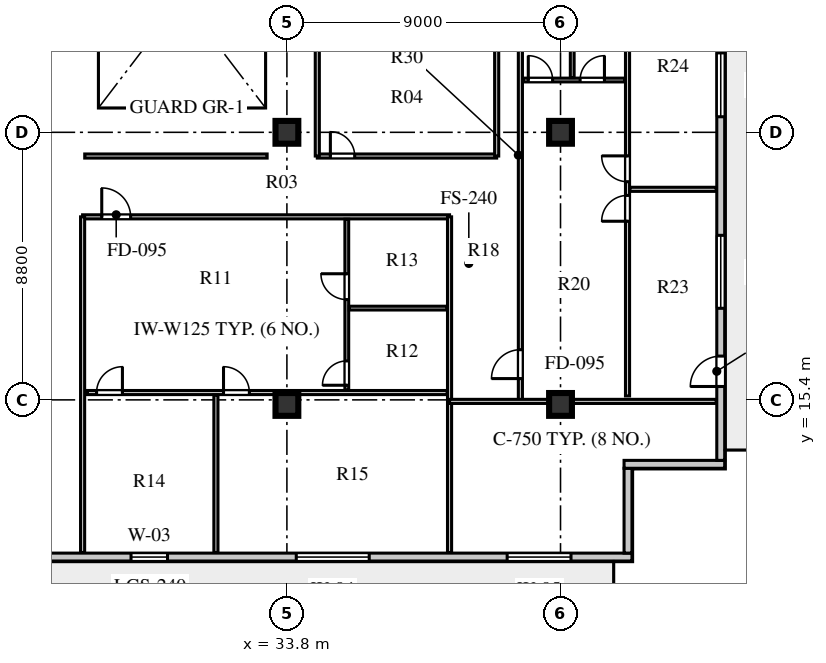
"""IFC4 building model, lengths in metres.
Left out: names, types, materials, properties, quantities, classifications, styles, units other than length and angle.
Written with IfcOpenShell. Run it as: python <this file> out.ifc"""

import sys

from ifc_helpers import new_model, si_unit, direction, frame, frame_2d, origin, origin_2d, place, context, subcontext, project, spatial, rectangle, extrude, element, fill, save


model = new_model("IFC4")
c1 = context("Model", 3, precision=1e-05, world=origin(), true_north=direction((0.0, 1.0)))
c2 = subcontext(c1, "Body", "Model", "MODEL_VIEW")
j1 = project(units=[si_unit("LENGTHUNIT", "METRE"), si_unit("PLANEANGLEUNIT", "RADIAN")], contexts=[c1])
p1 = place(None, origin())
s1 = spatial("IfcSite", under=j1, at=p1, CompositionType="ELEMENT")
p2 = place(p1, origin())
s2 = spatial("IfcBuilding", under=s1, at=p2, CompositionType="ELEMENT")
p3 = place(p2, frame((0.0, 0.0, 296.0)))
s3 = spatial("IfcBuildingStorey", under=s2, at=p3, CompositionType="ELEMENT", Elevation=296.0)
for number, where, z_axis, x_axis in (
    (1, (33.8, 15.25, 0.0), (0.0, 0.0, 1.0), (1.0, 0.0, 0.0)),
    (2, (33.8, 24.2, 0.0), (0.0, 0.0, 1.0), (1.0, 0.0, 0.0)),
    (3, (42.8, 15.25, 0.0), (0.0, 0.0, 1.0), (1.0, 0.0, 0.0)),
    (4, (42.8, 24.2, 0.0), (0.0, 0.0, 1.0), (1.0, 0.0, 0.0)),
):
    element("IfcColumn", number, at=place(p3, frame(where, z_axis=z_axis, x_axis=x_axis)), inside=s3, PredefinedType="COLUMN", context=c2, shape_type="SweptSolid", body=[
        extrude(rectangle(XDim=0.75, YDim=0.75, at=origin_2d()), origin(), (0.0, 0.0, 1.0), 3.66),
    ])
p4 = place(p3, frame((13.45, 10.23, 0.0), z_axis=(0.0, 0.0, 1.0), x_axis=(1.0, 0.0, 0.0)))
e5 = element("IfcWall", 5, at=p4, inside=s3, PredefinedType="SOLIDWALL", context=c2, shape_type="SweptSolid", body=[
    extrude(rectangle(XDim=31.7, YDim=0.26, at=frame_2d((15.85, 0.0))), origin(), (0.0, 0.0, 1.0), 3.66),
])
p5 = place(p4, frame((0.95, 0.0, 0.0)))
e6 = element("IfcOpeningElement", 6, at=p5, cuts=e5, PredefinedType="OPENING", context=c2, shape_type="SweptSolid", body=[
    extrude(rectangle(XDim=1.0, YDim=2.05, at=frame_2d((0.5, 1.025))), frame((0.0, 0.14, 0.0), z_axis=(0.0, -1.0, 0.0), x_axis=(1.0, 0.0, 0.0)), (0.0, 0.0, 1.0), 0.28),
])
p6 = place(p4, frame((6.085, 0.0, 0.8)))
e7 = element("IfcOpeningElement", 7, at=p6, cuts=e5, PredefinedType="OPENING", context=c2, shape_type="SweptSolid", body=[
    extrude(rectangle(XDim=1.5, YDim=2.0, at=frame_2d((0.75, 1.0))), frame((0.0, 0.14, 0.0), z_axis=(0.0, -1.0, 0.0), x_axis=(1.0, 0.0, 0.0)), (0.0, 0.0, 1.0), 0.28),
])
p7 = place(p4, frame((15.223, 0.0, 0.8)))
e8 = element("IfcOpeningElement", 8, at=p7, cuts=e5, PredefinedType="OPENING", context=c2, shape_type="SweptSolid", body=[
    extrude(rectangle(XDim=1.2, YDim=1.75, at=frame_2d((0.6, 0.875))), frame((0.0, 0.14, 0.0), z_axis=(0.0, -1.0, 0.0), x_axis=(1.0, 0.0, 0.0)), (0.0, 0.0, 1.0), 0.28),
])
p8 = place(p4, frame((20.658, 0.0, 0.8)))
e9 = element("IfcOpeningElement", 9, at=p8, cuts=e5, PredefinedType="OPENING", context=c2, shape_type="SweptSolid", body=[
    extrude(rectangle(XDim=2.4, YDim=2.05, at=frame_2d((1.2, 1.025))), frame((0.0, 0.14, 0.0), z_axis=(0.0, -1.0, 0.0), x_axis=(1.0, 0.0, 0.0)), (0.0, 0.0, 1.0), 0.28),
])
p9 = place(p4, frame((27.595, 0.0, 0.8)))
e10 = element("IfcOpeningElement", 10, at=p9, cuts=e5, PredefinedType="OPENING", context=c2, shape_type="SweptSolid", body=[
    extrude(rectangle(XDim=2.1, YDim=1.95, at=frame_2d((1.05, 0.975))), frame((0.0, 0.14, 0.0), z_axis=(0.0, -1.0, 0.0), x_axis=(1.0, 0.0, 0.0)), (0.0, 0.0, 1.0), 0.28),
])
p10 = place(p3, frame((45.02, 10.36, 0.0), z_axis=(0.0, 0.0, 1.0), x_axis=(0.0, 1.0, 0.0)))
e11 = element("IfcWall", 11, at=p10, inside=s3, PredefinedType="SOLIDWALL", context=c2, shape_type="SweptSolid", body=[
    extrude(rectangle(XDim=2.79, YDim=0.26, at=frame_2d((1.395, 0.0))), origin(), (0.0, 0.0, 1.0), 3.66),
])
p11 = place(p3, frame((44.89, 13.28, 0.0), z_axis=(0.0, 0.0, 1.0), x_axis=(1.0, 0.0, 0.0)))
e12 = element("IfcWall", 12, at=p11, inside=s3, PredefinedType="SOLIDWALL", context=c2, shape_type="SweptSolid", body=[
    extrude(rectangle(XDim=3.31, YDim=0.26, at=frame_2d((1.655, 0.0))), origin(), (0.0, 0.0, 1.0), 3.66),
])
p12 = place(p3, frame((48.07, 13.41, 0.0), z_axis=(0.0, 0.0, 1.0), x_axis=(0.0, 1.0, 0.0)))
e13 = element("IfcWall", 13, at=p12, inside=s3, PredefinedType="SOLIDWALL", context=c2, shape_type="SweptSolid", body=[
    extrude(rectangle(XDim=30.38, YDim=0.26, at=frame_2d((15.19, 0.0))), origin(), (0.0, 0.0, 1.0), 3.66),
])
p13 = place(p12, frame((2.43, 0.0, 0.0)))
e14 = element("IfcOpeningElement", 14, at=p13, cuts=e13, PredefinedType="OPENING", context=c2, shape_type="SweptSolid", body=[
    extrude(rectangle(XDim=1.0, YDim=2.05, at=frame_2d((0.5, 1.025))), frame((0.0, 0.14, 0.0), z_axis=(0.0, -1.0, 0.0), x_axis=(1.0, 0.0, 0.0)), (0.0, 0.0, 1.0), 0.28),
])
p14 = place(p12, frame((5.002, 0.0, 0.8)))
e15 = element("IfcOpeningElement", 15, at=p14, cuts=e13, PredefinedType="OPENING", context=c2, shape_type="SweptSolid", body=[
    extrude(rectangle(XDim=2.4, YDim=2.05, at=frame_2d((1.2, 1.025))), frame((0.0, 0.14, 0.0), z_axis=(0.0, -1.0, 0.0), x_axis=(1.0, 0.0, 0.0)), (0.0, 0.0, 1.0), 0.28),
])
p15 = place(p12, frame((11.302, 0.0, 0.8)))
e16 = element("IfcOpeningElement", 16, at=p15, cuts=e13, PredefinedType="OPENING", context=c2, shape_type="SweptSolid", body=[
    extrude(rectangle(XDim=2.1, YDim=1.95, at=frame_2d((1.05, 0.975))), frame((0.0, 0.14, 0.0), z_axis=(0.0, -1.0, 0.0), x_axis=(1.0, 0.0, 0.0)), (0.0, 0.0, 1.0), 0.28),
])
p16 = place(p12, frame((18.252, 0.0, 0.8)))
e17 = element("IfcOpeningElement", 17, at=p16, cuts=e13, PredefinedType="OPENING", context=c2, shape_type="SweptSolid", body=[
    extrude(rectangle(XDim=1.35, YDim=1.9, at=frame_2d((0.675, 0.95))), frame((0.0, 0.14, 0.0), z_axis=(0.0, -1.0, 0.0), x_axis=(1.0, 0.0, 0.0)), (0.0, 0.0, 1.0), 0.28),
])
p17 = place(p12, frame((24.427, 0.0, 0.8)))
e18 = element("IfcOpeningElement", 18, at=p17, cuts=e13, PredefinedType="OPENING", context=c2, shape_type="SweptSolid", body=[
    extrude(rectangle(XDim=1.65, YDim=1.95, at=frame_2d((0.825, 0.975))), frame((0.0, 0.14, 0.0), z_axis=(0.0, -1.0, 0.0), x_axis=(1.0, 0.0, 0.0)), (0.0, 0.0, 1.0), 0.28),
])
p18 = place(p3, frame((27.08, 21.42, 0.0), z_axis=(0.0, 0.0, 1.0), x_axis=(1.0, 0.0, 0.0)))
e19 = element("IfcWall", 19, at=p18, inside=s3, PredefinedType="PARTITIONING", context=c2, shape_type="SweptSolid", body=[
    extrude(rectangle(XDim=12.07, YDim=0.135, at=frame_2d((6.035, 0.0))), origin(), (0.0, 0.0, 1.0), 3.36),
])
p19 = place(p18, frame((0.63, 0.0, 0.0)))
e20 = element("IfcOpeningElement", 20, at=p19, cuts=e19, PredefinedType="OPENING", context=c2, shape_type="SweptSolid", body=[
    extrude(rectangle(XDim=0.95, YDim=2.1, at=frame_2d((0.475, 1.05))), frame((0.0, 0.078, 0.0), z_axis=(0.0, -1.0, 0.0), x_axis=(1.0, 0.0, 0.0)), (0.0, 0.0, 1.0), 0.155),
])
p20 = place(p3, frame((27.08, 10.38, 0.0), z_axis=(0.0, 0.0, 1.0), x_axis=(0.0, 1.0, 0.0)))
e21 = element("IfcWall", 21, at=p20, inside=s3, PredefinedType="PARTITIONING", context=c2, shape_type="SweptSolid", body=[
    extrude(rectangle(XDim=11.04, YDim=0.135, at=frame_2d((5.52, 0.0))), origin(), (0.0, 0.0, 1.0), 3.66),
])
p21 = place(p3, frame((27.15, 23.42, 0.0), z_axis=(0.0, 0.0, 1.0), x_axis=(1.0, 0.0, 0.0)))
e22 = element("IfcWall", 22, at=p21, inside=s3, PredefinedType="PARTITIONING", context=c2, shape_type="SweptSolid", body=[
    extrude(rectangle(XDim=6.0, YDim=0.135, at=frame_2d((3.0, 0.0))), origin(), (0.0, 0.0, 1.0), 3.66),
])
p22 = place(p3, frame((39.15, 10.38, 0.0), z_axis=(0.0, 0.0, 1.0), x_axis=(0.0, 1.0, 0.0)))
e23 = element("IfcWall", 23, at=p22, inside=s3, PredefinedType="PARTITIONING", context=c2, shape_type="SweptSolid", body=[
    extrude(rectangle(XDim=11.04, YDim=0.135, at=frame_2d((5.52, 0.0))), origin(), (0.0, 0.0, 1.0), 3.66),
])
p23 = place(p3, frame((27.24, 15.641, 0.0), z_axis=(0.0, 0.0, 1.0), x_axis=(1.0, 0.0, 0.0)))
e24 = element("IfcWall", 24, at=p23, inside=s3, PredefinedType="PARTITIONING", context=c2, shape_type="SweptSolid", body=[
    extrude(rectangle(XDim=11.83, YDim=0.135, at=frame_2d((5.915, 0.0))), origin(), (0.0, 0.0, 1.0), 3.66),
])
p24 = place(p23, frame((0.3, 0.0, 0.0)))
e25 = element("IfcOpeningElement", 25, at=p24, cuts=e24, PredefinedType="OPENING", context=c2, shape_type="SweptSolid", body=[
    extrude(rectangle(XDim=0.85, YDim=2.08, at=frame_2d((0.425, 1.04))), frame((0.0, 0.078, 0.0), z_axis=(0.0, -1.0, 0.0), x_axis=(1.0, 0.0, 0.0)), (0.0, 0.0, 1.0), 0.155),
])
p25 = place(p23, frame((4.475, 0.0, 0.0)))
e26 = element("IfcOpeningElement", 26, at=p25, cuts=e24, PredefinedType="OPENING", context=c2, shape_type="SweptSolid", body=[
    extrude(rectangle(XDim=0.85, YDim=2.08, at=frame_2d((0.425, 1.04))), frame((0.0, 0.078, 0.0), z_axis=(0.0, -1.0, 0.0), x_axis=(1.0, 0.0, 0.0)), (0.0, 0.0, 1.0), 0.155),
])
p26 = place(p3, frame((35.77, 15.721, 0.0), z_axis=(0.0, 0.0, 1.0), x_axis=(0.0, 1.0, 0.0)))
e27 = element("IfcWall", 27, at=p26, inside=s3, PredefinedType="PLUMBINGWALL", context=c2, shape_type="SweptSolid", body=[
    extrude(rectangle(XDim=5.619, YDim=0.125, at=frame_2d((2.81, 0.0))), origin(), (0.0, 0.0, 1.0), 3.66),
])
p27 = place(p26, frame((0.16, 0.0, 0.0)))
e28 = element("IfcOpeningElement", 28, at=p27, cuts=e27, PredefinedType="OPENING", context=c2, shape_type="SweptSolid", body=[
    extrude(rectangle(XDim=0.8, YDim=2.05, at=frame_2d((0.4, 1.025))), frame((0.0, 0.073, 0.0), z_axis=(0.0, -1.0, 0.0), x_axis=(1.0, 0.0, 0.0)), (0.0, 0.0, 1.0), 0.145),
])
p28 = place(p26, frame((2.977, 0.0, 0.0)))
e29 = element("IfcOpeningElement", 29, at=p28, cuts=e27, PredefinedType="OPENING", context=c2, shape_type="SweptSolid", body=[
    extrude(rectangle(XDim=0.85, YDim=2.08, at=frame_2d((0.425, 1.04))), frame((0.0, 0.073, 0.0), z_axis=(0.0, -1.0, 0.0), x_axis=(1.0, 0.0, 0.0)), (0.0, 0.0, 1.0), 0.145),
])
p29 = place(p3, frame((35.85, 18.418, 0.0), z_axis=(0.0, 0.0, 1.0), x_axis=(1.0, 0.0, 0.0)))
e30 = element("IfcWall", 30, at=p29, inside=s3, PredefinedType="PLUMBINGWALL", context=c2, shape_type="SweptSolid", body=[
    extrude(rectangle(XDim=3.22, YDim=0.125, at=frame_2d((1.61, 0.0))), origin(), (0.0, 0.0, 1.0), 3.36),
])
p30 = place(p3, frame((31.465, 10.38, 0.0), z_axis=(0.0, 0.0, 1.0), x_axis=(0.0, 1.0, 0.0)))
e31 = element("IfcWall", 31, at=p30, inside=s3, PredefinedType="PARTITIONING", context=c2, shape_type="SweptSolid", body=[
    extrude(rectangle(XDim=5.181, YDim=0.135, at=frame_2d((2.591, 0.0))), origin(), (0.0, 0.0, 1.0), 3.66),
])
p31 = place(p3, frame((41.48, 15.35, 0.0), z_axis=(0.0, 0.0, 1.0), x_axis=(0.0, 1.0, 0.0)))
e32 = element("IfcWall", 32, at=p31, inside=s3, PredefinedType="PARTITIONING", context=c2, shape_type="SweptSolid", body=[
    extrude(rectangle(XDim=26.5, YDim=0.135, at=frame_2d((13.25, 0.0))), origin(), (0.0, 0.0, 1.0), 3.66),
])
p32 = place(p31, frame((0.75, 0.0, 0.0)))
e33 = element("IfcOpeningElement", 33, at=p32, cuts=e32, PredefinedType="OPENING", context=c2, shape_type="SweptSolid", body=[
    extrude(rectangle(XDim=0.95, YDim=2.1, at=frame_2d((0.475, 1.05))), frame((0.0, 0.078, 0.0), z_axis=(0.0, -1.0, 0.0), x_axis=(1.0, 0.0, 0.0)), (0.0, 0.0, 1.0), 0.155),
])
p33 = place(p31, frame((14.5, 0.0, 0.0)))
e34 = element("IfcOpeningElement", 34, at=p33, cuts=e32, PredefinedType="OPENING", context=c2, shape_type="SweptSolid", body=[
    extrude(rectangle(XDim=0.95, YDim=2.1, at=frame_2d((0.475, 1.05))), frame((0.0, 0.078, 0.0), z_axis=(0.0, -1.0, 0.0), x_axis=(1.0, 0.0, 0.0)), (0.0, 0.0, 1.0), 0.155),
])
p34 = place(p3, frame((39.15, 15.35, 0.0), z_axis=(0.0, 0.0, 1.0), x_axis=(1.0, 0.0, 0.0)))
e35 = element("IfcWall", 35, at=p34, inside=s3, PredefinedType="PARTITIONING", context=c2, shape_type="SweptSolid", body=[
    extrude(rectangle(XDim=8.77, YDim=0.135, at=frame_2d((4.385, 0.0))), origin(), (0.0, 0.0, 1.0), 3.06),
])
p35 = place(p3, frame((45.004, 15.53, 0.0), z_axis=(0.0, 0.0, 1.0), x_axis=(0.0, 1.0, 0.0)))
e36 = element("IfcWall", 36, at=p35, inside=s3, PredefinedType="PARTITIONING", context=c2, shape_type="SweptSolid", body=[
    extrude(rectangle(XDim=13.59, YDim=0.135, at=frame_2d((6.795, 0.0))), origin(), (0.0, 0.0, 1.0), 3.66),
])
p36 = place(p35, frame((5.745, 0.0, 0.0)))
e37 = element("IfcOpeningElement", 37, at=p36, cuts=e36, PredefinedType="OPENING", context=c2, shape_type="SweptSolid", body=[
    extrude(rectangle(XDim=0.85, YDim=2.08, at=frame_2d((0.425, 1.04))), frame((0.0, 0.078, 0.0), z_axis=(0.0, -1.0, 0.0), x_axis=(1.0, 0.0, 0.0)), (0.0, 0.0, 1.0), 0.155),
])
p37 = place(p35, frame((7.045, 0.0, 0.0)))
e38 = element("IfcOpeningElement", 38, at=p37, cuts=e36, PredefinedType="OPENING", context=c2, shape_type="SweptSolid", body=[
    extrude(rectangle(XDim=0.85, YDim=2.08, at=frame_2d((0.425, 1.04))), frame((0.0, 0.078, 0.0), z_axis=(0.0, -1.0, 0.0), x_axis=(1.0, 0.0, 0.0)), (0.0, 0.0, 1.0), 0.155),
])
p38 = place(p3, frame((41.58, 25.92, 0.0), z_axis=(0.0, 0.0, 1.0), x_axis=(1.0, 0.0, 0.0)))
e39 = element("IfcWall", 39, at=p38, inside=s3, PredefinedType="PLUMBINGWALL", context=c2, shape_type="SweptSolid", body=[
    extrude(rectangle(XDim=3.344, YDim=0.125, at=frame_2d((1.672, 0.0))), origin(), (0.0, 0.0, 1.0), 3.66),
])
p39 = place(p38, frame((0.16, 0.0, 0.0)))
e40 = element("IfcOpeningElement", 40, at=p39, cuts=e39, PredefinedType="OPENING", context=c2, shape_type="SweptSolid", body=[
    extrude(rectangle(XDim=0.8, YDim=2.05, at=frame_2d((0.4, 1.025))), frame((0.0, 0.073, 0.0), z_axis=(0.0, -1.0, 0.0), x_axis=(1.0, 0.0, 0.0)), (0.0, 0.0, 1.0), 0.145),
])
p40 = place(p38, frame((1.865, 0.0, 0.0)))
e41 = element("IfcOpeningElement", 41, at=p40, cuts=e39, PredefinedType="OPENING", context=c2, shape_type="SweptSolid", body=[
    extrude(rectangle(XDim=0.8, YDim=2.05, at=frame_2d((0.4, 1.025))), frame((0.0, 0.073, 0.0), z_axis=(0.0, -1.0, 0.0), x_axis=(1.0, 0.0, 0.0)), (0.0, 0.0, 1.0), 0.145),
])
p41 = place(p3, frame((43.185, 26.0, 0.0), z_axis=(0.0, 0.0, 1.0), x_axis=(0.0, 1.0, 0.0)))
e42 = element("IfcWall", 42, at=p41, inside=s3, PredefinedType="PLUMBINGWALL", context=c2, shape_type="SweptSolid", body=[
    extrude(rectangle(XDim=3.12, YDim=0.125, at=frame_2d((1.56, 0.0))), origin(), (0.0, 0.0, 1.0), 3.66),
])
p42 = place(p3, frame((45.084, 22.325, 0.0), z_axis=(0.0, 0.0, 1.0), x_axis=(1.0, 0.0, 0.0)))
e43 = element("IfcWall", 43, at=p42, inside=s3, PredefinedType="PARTITIONING", context=c2, shape_type="SweptSolid", body=[
    extrude(rectangle(XDim=2.836, YDim=0.135, at=frame_2d((1.418, 0.0))), origin(), (0.0, 0.0, 1.0), 3.66),
])
p43 = place(p3, frame((34.8, 23.42, 0.0), z_axis=(0.0, 0.0, 1.0), x_axis=(1.0, 0.0, 0.0)))
e44 = element("IfcWall", 44, at=p43, inside=s3, PredefinedType="PARTITIONING", context=c2, shape_type="SweptSolid", body=[
    extrude(rectangle(XDim=5.9, YDim=0.135, at=frame_2d((2.95, 0.0))), origin(), (0.0, 0.0, 1.0), 3.66),
])
p44 = place(p43, frame((0.43, 0.0, 0.0)))
e45 = element("IfcOpeningElement", 45, at=p44, cuts=e44, PredefinedType="OPENING", context=c2, shape_type="SweptSolid", body=[
    extrude(rectangle(XDim=0.8, YDim=2.05, at=frame_2d((0.4, 1.025))), frame((0.0, 0.078, 0.0), z_axis=(0.0, -1.0, 0.0), x_axis=(1.0, 0.0, 0.0)), (0.0, 0.0, 1.0), 0.155),
])
for number, where, z_axis, x_axis in (
    (46, (34.8, 23.42, 0.0), (0.0, 0.0, 1.0), (0.0, 1.0, 0.0)),
    (47, (40.7, 23.42, 0.0), (0.0, 0.0, 1.0), (0.0, 1.0, 0.0)),
):
    element("IfcWall", number, at=place(p3, frame(where, z_axis=z_axis, x_axis=x_axis)), inside=s3, PredefinedType="PARTITIONING", context=c2, shape_type="SweptSolid", body=[
        extrude(rectangle(XDim=3.78, YDim=0.135, at=frame_2d((1.89, 0.0))), origin(), (0.0, 0.0, 1.0), 3.66),
    ])
p45 = place(p7, origin())
e48 = element("IfcWindow", 48, at=p45, inside=s3, PartitioningType="SINGLE_PANEL", PredefinedType="WINDOW", context=c2, shape_type="SweptSolid", body=[
    extrude(rectangle(XDim=1.2, YDim=1.75, at=frame_2d((0.6, 0.875))), frame((0.0, 0.03, 0.0), z_axis=(0.0, -1.0, 0.0), x_axis=(1.0, 0.0, 0.0)), (0.0, 0.0, 1.0), 0.06),
])
fill(e8, e48)
p46 = place(p8, origin())
e49 = element("IfcWindow", 49, at=p46, inside=s3, PartitioningType="SINGLE_PANEL", PredefinedType="WINDOW", context=c2, shape_type="SweptSolid", body=[
    extrude(rectangle(XDim=2.4, YDim=2.05, at=frame_2d((1.2, 1.025))), frame((0.0, 0.03, 0.0), z_axis=(0.0, -1.0, 0.0), x_axis=(1.0, 0.0, 0.0)), (0.0, 0.0, 1.0), 0.06),
])
fill(e9, e49)
p47 = place(p9, origin())
e50 = element("IfcWindow", 50, at=p47, inside=s3, PartitioningType="SINGLE_PANEL", PredefinedType="WINDOW", context=c2, shape_type="SweptSolid", body=[
    extrude(rectangle(XDim=2.1, YDim=1.95, at=frame_2d((1.05, 0.975))), frame((0.0, 0.03, 0.0), z_axis=(0.0, -1.0, 0.0), x_axis=(1.0, 0.0, 0.0)), (0.0, 0.0, 1.0), 0.06),
])
fill(e10, e50)
p48 = place(p13, frame((1.0, 0.0, 0.0), z_axis=(0.0, 0.0, 1.0), x_axis=(-1.0, 0.0, 0.0)))
e51 = element("IfcDoor", 51, at=p48, inside=s3, OperationType="SINGLE_SWING_RIGHT", PredefinedType="DOOR", context=c2, shape_type="SweptSolid", body=[
    extrude(rectangle(XDim=1.0, YDim=2.05, at=frame_2d((0.5, 1.025))), frame((0.0, 0.025, 0.0), z_axis=(0.0, -1.0, 0.0), x_axis=(1.0, 0.0, 0.0)), (0.0, 0.0, 1.0), 0.05),
])
fill(e14, e51)
p49 = place(p14, origin())
e52 = element("IfcWindow", 52, at=p49, inside=s3, PartitioningType="SINGLE_PANEL", PredefinedType="WINDOW", context=c2, shape_type="SweptSolid", body=[
    extrude(rectangle(XDim=2.4, YDim=2.05, at=frame_2d((1.2, 1.025))), frame((0.0, 0.03, 0.0), z_axis=(0.0, -1.0, 0.0), x_axis=(1.0, 0.0, 0.0)), (0.0, 0.0, 1.0), 0.06),
])
fill(e15, e52)
p50 = place(p15, origin())
e53 = element("IfcWindow", 53, at=p50, inside=s3, PartitioningType="SINGLE_PANEL", PredefinedType="WINDOW", context=c2, shape_type="SweptSolid", body=[
    extrude(rectangle(XDim=2.1, YDim=1.95, at=frame_2d((1.05, 0.975))), frame((0.0, 0.03, 0.0), z_axis=(0.0, -1.0, 0.0), x_axis=(1.0, 0.0, 0.0)), (0.0, 0.0, 1.0), 0.06),
])
fill(e16, e53)
p51 = place(p27, origin())
e54 = element("IfcDoor", 54, at=p51, inside=s3, OperationType="SINGLE_SWING_LEFT", PredefinedType="DOOR", context=c2, shape_type="SweptSolid", body=[
    extrude(rectangle(XDim=0.8, YDim=2.05, at=frame_2d((0.4, 1.025))), frame((0.0, 0.025, 0.0), z_axis=(0.0, -1.0, 0.0), x_axis=(1.0, 0.0, 0.0)), (0.0, 0.0, 1.0), 0.05),
])
fill(e28, e54)
p52 = place(p28, origin())
e55 = element("IfcDoor", 55, at=p52, inside=s3, OperationType="SINGLE_SWING_RIGHT", PredefinedType="DOOR", context=c2, shape_type="SweptSolid", body=[
    extrude(rectangle(XDim=0.85, YDim=2.08, at=frame_2d((0.425, 1.04))), frame((0.0, 0.025, 0.0), z_axis=(0.0, -1.0, 0.0), x_axis=(1.0, 0.0, 0.0)), (0.0, 0.0, 1.0), 0.05),
])
fill(e29, e55)
p53 = place(p24, frame((0.85, 0.0, 0.0), z_axis=(0.0, 0.0, 1.0), x_axis=(-1.0, 0.0, 0.0)))
e56 = element("IfcDoor", 56, at=p53, inside=s3, OperationType="SINGLE_SWING_LEFT", PredefinedType="DOOR", context=c2, shape_type="SweptSolid", body=[
    extrude(rectangle(XDim=0.85, YDim=2.08, at=frame_2d((0.425, 1.04))), frame((0.0, 0.025, 0.0), z_axis=(0.0, -1.0, 0.0), x_axis=(1.0, 0.0, 0.0)), (0.0, 0.0, 1.0), 0.05),
])
fill(e25, e56)
p54 = place(p25, frame((0.85, 0.0, 0.0), z_axis=(0.0, 0.0, 1.0), x_axis=(-1.0, 0.0, 0.0)))
e57 = element("IfcDoor", 57, at=p54, inside=s3, OperationType="SINGLE_SWING_RIGHT", PredefinedType="DOOR", context=c2, shape_type="SweptSolid", body=[
    extrude(rectangle(XDim=0.85, YDim=2.08, at=frame_2d((0.425, 1.04))), frame((0.0, 0.025, 0.0), z_axis=(0.0, -1.0, 0.0), x_axis=(1.0, 0.0, 0.0)), (0.0, 0.0, 1.0), 0.05),
])
fill(e26, e57)
p55 = place(p19, frame((0.95, 0.0, 0.0), z_axis=(0.0, 0.0, 1.0), x_axis=(-1.0, 0.0, 0.0)))
e58 = element("IfcDoor", 58, at=p55, inside=s3, OperationType="SINGLE_SWING_RIGHT", PredefinedType="DOOR", context=c2, shape_type="SweptSolid", body=[
    extrude(rectangle(XDim=0.95, YDim=2.1, at=frame_2d((0.475, 1.05))), frame((0.0, 0.025, 0.0), z_axis=(0.0, -1.0, 0.0), x_axis=(1.0, 0.0, 0.0)), (0.0, 0.0, 1.0), 0.05),
])
fill(e20, e58)
p56 = place(p39, origin())
e59 = element("IfcDoor", 59, at=p56, inside=s3, OperationType="SINGLE_SWING_LEFT", PredefinedType="DOOR", context=c2, shape_type="SweptSolid", body=[
    extrude(rectangle(XDim=0.8, YDim=2.05, at=frame_2d((0.4, 1.025))), frame((0.0, 0.025, 0.0), z_axis=(0.0, -1.0, 0.0), x_axis=(1.0, 0.0, 0.0)), (0.0, 0.0, 1.0), 0.05),
])
fill(e40, e59)
p57 = place(p40, origin())
e60 = element("IfcDoor", 60, at=p57, inside=s3, OperationType="SINGLE_SWING_RIGHT", PredefinedType="DOOR", context=c2, shape_type="SweptSolid", body=[
    extrude(rectangle(XDim=0.8, YDim=2.05, at=frame_2d((0.4, 1.025))), frame((0.0, 0.025, 0.0), z_axis=(0.0, -1.0, 0.0), x_axis=(1.0, 0.0, 0.0)), (0.0, 0.0, 1.0), 0.05),
])
fill(e41, e60)
p58 = place(p36, origin())
e61 = element("IfcDoor", 61, at=p58, inside=s3, OperationType="SINGLE_SWING_LEFT", PredefinedType="DOOR", context=c2, shape_type="SweptSolid", body=[
    extrude(rectangle(XDim=0.85, YDim=2.08, at=frame_2d((0.425, 1.04))), frame((0.0, 0.025, 0.0), z_axis=(0.0, -1.0, 0.0), x_axis=(1.0, 0.0, 0.0)), (0.0, 0.0, 1.0), 0.05),
])
fill(e37, e61)
p59 = place(p37, origin())
e62 = element("IfcDoor", 62, at=p59, inside=s3, OperationType="SINGLE_SWING_RIGHT", PredefinedType="DOOR", context=c2, shape_type="SweptSolid", body=[
    extrude(rectangle(XDim=0.85, YDim=2.08, at=frame_2d((0.425, 1.04))), frame((0.0, 0.025, 0.0), z_axis=(0.0, -1.0, 0.0), x_axis=(1.0, 0.0, 0.0)), (0.0, 0.0, 1.0), 0.05),
])
fill(e38, e62)
p60 = place(p32, origin())
e63 = element("IfcDoor", 63, at=p60, inside=s3, OperationType="SINGLE_SWING_LEFT", PredefinedType="DOOR", context=c2, shape_type="SweptSolid", body=[
    extrude(rectangle(XDim=0.95, YDim=2.1, at=frame_2d((0.475, 1.05))), frame((0.0, 0.025, 0.0), z_axis=(0.0, -1.0, 0.0), x_axis=(1.0, 0.0, 0.0)), (0.0, 0.0, 1.0), 0.05),
])
fill(e33, e63)
p61 = place(p44, origin())
e64 = element("IfcDoor", 64, at=p61, inside=s3, OperationType="SINGLE_SWING_LEFT", PredefinedType="DOOR", context=c2, shape_type="SweptSolid", body=[
    extrude(rectangle(XDim=0.8, YDim=2.05, at=frame_2d((0.4, 1.025))), frame((0.0, 0.025, 0.0), z_axis=(0.0, -1.0, 0.0), x_axis=(1.0, 0.0, 0.0)), (0.0, 0.0, 1.0), 0.05),
])
fill(e45, e64)
save(model, sys.argv[1])
